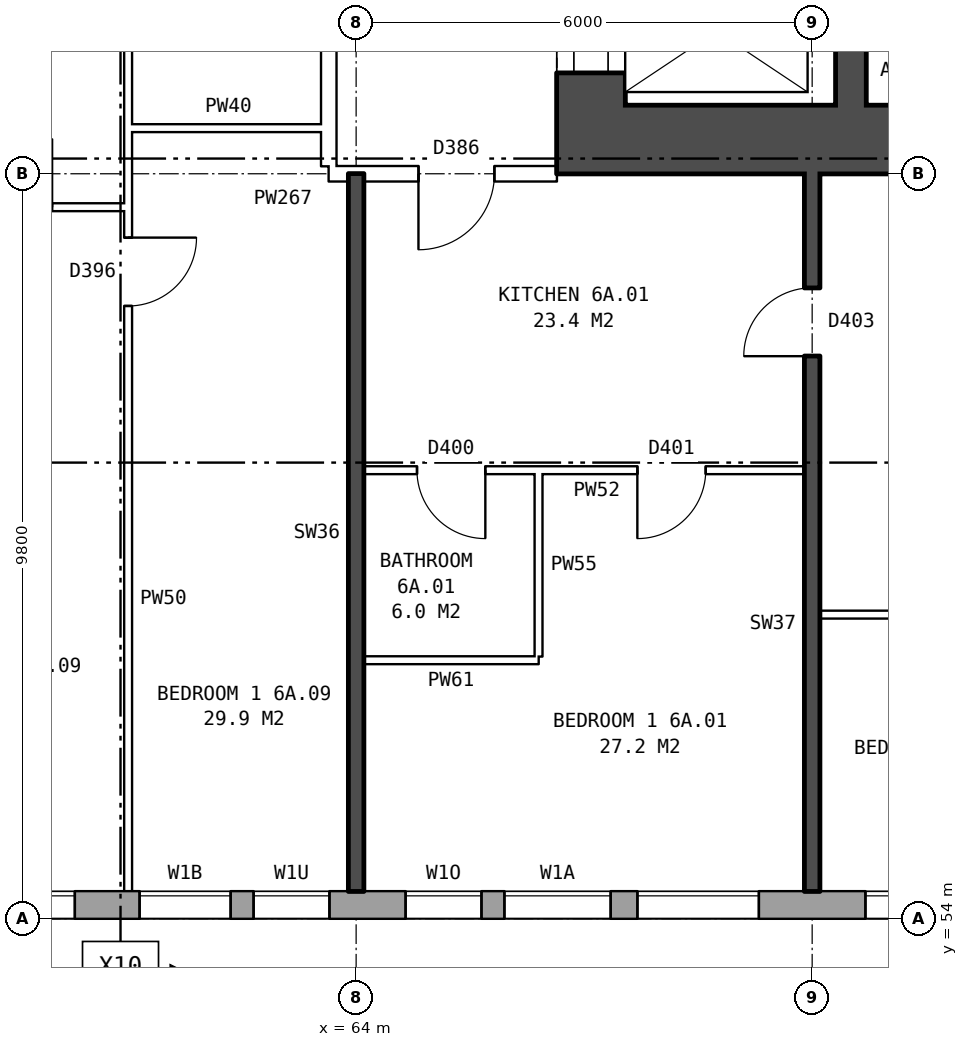
"""IFC4 building model, lengths in metres.
Left out: names, types, materials, properties, quantities, classifications, styles, units other than length and angle.
Written with IfcOpenShell. Run it as: python <this file> out.ifc"""

import sys

from ifc_helpers import new_model, si_unit, direction, frame, frame_2d, origin, place, context, subcontext, project, spatial, rectangle, extrude, element, fill, save


model = new_model("IFC4")
c1 = context("Model", 3, precision=1e-05, world=origin(), true_north=direction((0.0, 1.0)))
c2 = subcontext(c1, "Body", "Model", "MODEL_VIEW")
j1 = project(units=[si_unit("LENGTHUNIT", "METRE"), si_unit("PLANEANGLEUNIT", "RADIAN")], contexts=[c1])
p1 = place(None, origin())
s1 = spatial("IfcSite", under=j1, at=p1, CompositionType="ELEMENT")
p2 = place(p1, origin())
s2 = spatial("IfcBuilding", under=s1, at=p2, CompositionType="ELEMENT")
p3 = place(p2, frame((0.0, 0.0, 25.7)))
s3 = spatial("IfcBuildingStorey", under=s2, at=p3, CompositionType="ELEMENT", Elevation=25.7)
p4 = place(p3, frame((22.825, 54.18, 0.0), z_axis=(0.0, 0.0, 1.0), x_axis=(1.0, 0.0, 0.0)))
e1 = element("IfcWall", 1, at=p4, inside=s3, PredefinedType="STANDARD", context=c2, shape_type="SweptSolid", body=[
    extrude(rectangle(XDim=50.101, YDim=0.36, at=frame_2d((25.05, 0.0))), origin(), (0.0, 0.0, 1.0), 2.85),
])
p5 = place(p4, frame((2.875, 0.0, 0.8)))
e2 = element("IfcOpeningElement", 2, at=p5, cuts=e1, PredefinedType="OPENING", context=c2, shape_type="SweptSolid", body=[
    extrude(rectangle(XDim=1.6, YDim=1.8, at=frame_2d((0.8, 0.9))), frame((0.0, 0.19, 0.0), z_axis=(0.0, -1.0, 0.0), x_axis=(1.0, 0.0, 0.0)), (0.0, 0.0, 1.0), 0.38),
])
p6 = place(p4, frame((5.875, 0.0, 0.8)))
e3 = element("IfcOpeningElement", 3, at=p6, cuts=e1, PredefinedType="OPENING", context=c2, shape_type="SweptSolid", body=[
    extrude(rectangle(XDim=1.6, YDim=1.8, at=frame_2d((0.8, 0.9))), frame((0.0, 0.19, 0.0), z_axis=(0.0, -1.0, 0.0), x_axis=(1.0, 0.0, 0.0)), (0.0, 0.0, 1.0), 0.38),
])
p7 = place(p4, frame((7.775, 0.0, 1.6)))
e4 = element("IfcOpeningElement", 4, at=p7, cuts=e1, PredefinedType="OPENING", context=c2, shape_type="SweptSolid", body=[
    extrude(rectangle(XDim=0.8, YDim=0.9, at=frame_2d((0.4, 0.45))), frame((0.0, 0.19, 0.0), z_axis=(0.0, -1.0, 0.0), x_axis=(1.0, 0.0, 0.0)), (0.0, 0.0, 1.0), 0.38),
])
p8 = place(p4, frame((11.875, 0.0, 0.8)))
e5 = element("IfcOpeningElement", 5, at=p8, cuts=e1, PredefinedType="OPENING", context=c2, shape_type="SweptSolid", body=[
    extrude(rectangle(XDim=1.6, YDim=1.8, at=frame_2d((0.8, 0.9))), frame((0.0, 0.19, 0.0), z_axis=(0.0, -1.0, 0.0), x_axis=(1.0, 0.0, 0.0)), (0.0, 0.0, 1.0), 0.38),
])
p9 = place(p4, frame((14.875, 0.0, 0.8)))
e6 = element("IfcOpeningElement", 6, at=p9, cuts=e1, PredefinedType="OPENING", context=c2, shape_type="SweptSolid", body=[
    extrude(rectangle(XDim=1.6, YDim=1.8, at=frame_2d((0.8, 0.9))), frame((0.0, 0.19, 0.0), z_axis=(0.0, -1.0, 0.0), x_axis=(1.0, 0.0, 0.0)), (0.0, 0.0, 1.0), 0.38),
])
p10 = place(p4, frame((17.875, 0.0, 0.8)))
e7 = element("IfcOpeningElement", 7, at=p10, cuts=e1, PredefinedType="OPENING", context=c2, shape_type="SweptSolid", body=[
    extrude(rectangle(XDim=1.6, YDim=1.8, at=frame_2d((0.8, 0.9))), frame((0.0, 0.19, 0.0), z_axis=(0.0, -1.0, 0.0), x_axis=(1.0, 0.0, 0.0)), (0.0, 0.0, 1.0), 0.38),
])
p11 = place(p4, frame((20.875, 0.0, 0.8)))
e8 = element("IfcOpeningElement", 8, at=p11, cuts=e1, PredefinedType="OPENING", context=c2, shape_type="SweptSolid", body=[
    extrude(rectangle(XDim=1.6, YDim=1.8, at=frame_2d((0.8, 0.9))), frame((0.0, 0.19, 0.0), z_axis=(0.0, -1.0, 0.0), x_axis=(1.0, 0.0, 0.0)), (0.0, 0.0, 1.0), 0.38),
])
p12 = place(p4, frame((23.875, 0.0, 0.8)))
e9 = element("IfcOpeningElement", 9, at=p12, cuts=e1, PredefinedType="OPENING", context=c2, shape_type="SweptSolid", body=[
    extrude(rectangle(XDim=1.6, YDim=1.8, at=frame_2d((0.8, 0.9))), frame((0.0, 0.19, 0.0), z_axis=(0.0, -1.0, 0.0), x_axis=(1.0, 0.0, 0.0)), (0.0, 0.0, 1.0), 0.38),
])
p13 = place(p4, frame((26.875, 0.0, 0.8)))
e10 = element("IfcOpeningElement", 10, at=p13, cuts=e1, PredefinedType="OPENING", context=c2, shape_type="SweptSolid", body=[
    extrude(rectangle(XDim=1.6, YDim=1.8, at=frame_2d((0.8, 0.9))), frame((0.0, 0.19, 0.0), z_axis=(0.0, -1.0, 0.0), x_axis=(1.0, 0.0, 0.0)), (0.0, 0.0, 1.0), 0.38),
])
p14 = place(p4, frame((29.875, 0.0, 0.8)))
e11 = element("IfcOpeningElement", 11, at=p14, cuts=e1, PredefinedType="OPENING", context=c2, shape_type="SweptSolid", body=[
    extrude(rectangle(XDim=1.6, YDim=1.8, at=frame_2d((0.8, 0.9))), frame((0.0, 0.19, 0.0), z_axis=(0.0, -1.0, 0.0), x_axis=(1.0, 0.0, 0.0)), (0.0, 0.0, 1.0), 0.38),
])
p15 = place(p4, frame((32.875, 0.0, 0.8)))
e12 = element("IfcOpeningElement", 12, at=p15, cuts=e1, PredefinedType="OPENING", context=c2, shape_type="SweptSolid", body=[
    extrude(rectangle(XDim=1.6, YDim=1.8, at=frame_2d((0.8, 0.9))), frame((0.0, 0.19, 0.0), z_axis=(0.0, -1.0, 0.0), x_axis=(1.0, 0.0, 0.0)), (0.0, 0.0, 1.0), 0.38),
])
p16 = place(p4, frame((35.875, 0.0, 0.8)))
e13 = element("IfcOpeningElement", 13, at=p16, cuts=e1, PredefinedType="OPENING", context=c2, shape_type="SweptSolid", body=[
    extrude(rectangle(XDim=1.6, YDim=1.8, at=frame_2d((0.8, 0.9))), frame((0.0, 0.19, 0.0), z_axis=(0.0, -1.0, 0.0), x_axis=(1.0, 0.0, 0.0)), (0.0, 0.0, 1.0), 0.38),
])
p17 = place(p4, frame((38.325, 0.0, 0.15)))
e14 = element("IfcOpeningElement", 14, at=p17, cuts=e1, PredefinedType="OPENING", context=c2, shape_type="SweptSolid", body=[
    extrude(rectangle(XDim=1.2, YDim=1.8, at=frame_2d((0.6, 0.9))), frame((0.0, 0.19, 0.0), z_axis=(0.0, -1.0, 0.0), x_axis=(1.0, 0.0, 0.0)), (0.0, 0.0, 1.0), 0.38),
])
p18 = place(p4, frame((41.825, 0.0, 1.4)))
e15 = element("IfcOpeningElement", 15, at=p18, cuts=e1, PredefinedType="OPENING", context=c2, shape_type="SweptSolid", body=[
    extrude(rectangle(XDim=1.0, YDim=1.2, at=frame_2d((0.5, 0.6))), frame((0.0, 0.19, 0.0), z_axis=(0.0, -1.0, 0.0), x_axis=(1.0, 0.0, 0.0)), (0.0, 0.0, 1.0), 0.38),
])
p19 = place(p4, frame((44.875, 0.0, 0.8)))
e16 = element("IfcOpeningElement", 16, at=p19, cuts=e1, PredefinedType="OPENING", context=c2, shape_type="SweptSolid", body=[
    extrude(rectangle(XDim=1.6, YDim=1.8, at=frame_2d((0.8, 0.9))), frame((0.0, 0.19, 0.0), z_axis=(0.0, -1.0, 0.0), x_axis=(1.0, 0.0, 0.0)), (0.0, 0.0, 1.0), 0.38),
])
p20 = place(p4, frame((47.875, 0.0, 0.8)))
e17 = element("IfcOpeningElement", 17, at=p20, cuts=e1, PredefinedType="OPENING", context=c2, shape_type="SweptSolid", body=[
    extrude(rectangle(XDim=1.6, YDim=1.8, at=frame_2d((0.8, 0.9))), frame((0.0, 0.19, 0.0), z_axis=(0.0, -1.0, 0.0), x_axis=(1.0, 0.0, 0.0)), (0.0, 0.0, 1.0), 0.38),
])
p21 = place(p4, frame((10.175, 0.0, 0.8)))
e18 = element("IfcOpeningElement", 18, at=p21, cuts=e1, PredefinedType="OPENING", context=c2, shape_type="SweptSolid", body=[
    extrude(rectangle(XDim=0.8, YDim=0.9, at=frame_2d((0.4, 0.45))), frame((0.0, 0.19, 0.0), z_axis=(0.0, -1.0, 0.0), x_axis=(1.0, 0.0, 0.0)), (0.0, 0.0, 1.0), 0.38),
])
p22 = place(p4, frame((39.825, 0.0, 0.15)))
e19 = element("IfcOpeningElement", 19, at=p22, cuts=e1, PredefinedType="OPENING", context=c2, shape_type="SweptSolid", body=[
    extrude(rectangle(XDim=1.0, YDim=0.9, at=frame_2d((0.5, 0.45))), frame((0.0, 0.19, 0.0), z_axis=(0.0, -1.0, 0.0), x_axis=(1.0, 0.0, 0.0)), (0.0, 0.0, 1.0), 0.38),
])
p23 = place(p4, frame((43.125, 0.0, 0.8)))
e20 = element("IfcOpeningElement", 20, at=p23, cuts=e1, PredefinedType="OPENING", context=c2, shape_type="SweptSolid", body=[
    extrude(rectangle(XDim=1.4, YDim=1.8, at=frame_2d((0.7, 0.9))), frame((0.0, 0.19, 0.0), z_axis=(0.0, -1.0, 0.0), x_axis=(1.0, 0.0, 0.0)), (0.0, 0.0, 1.0), 0.38),
])
p24 = place(p3, frame((67.09, 64.7, 0.0), z_axis=(0.0, 0.0, 1.0), x_axis=(0.0, 1.0, 0.0)))
e21 = element("IfcWall", 21, at=p24, inside=s3, PredefinedType="SHEAR", context=c2, shape_type="SweptSolid", body=[
    extrude(rectangle(XDim=10.6, YDim=0.9, at=frame_2d((5.3, 0.0))), origin(), (0.0, 0.0, 1.0), 2.85),
])
p25 = place(p24, frame((0.425, 0.0, 0.0)))
e22 = element("IfcOpeningElement", 22, at=p25, cuts=e21, PredefinedType="OPENING", context=c2, shape_type="SweptSolid", body=[
    extrude(rectangle(XDim=1.1, YDim=2.1, at=frame_2d((0.55, 1.05))), frame((0.0, 0.46, 0.0), z_axis=(0.0, -1.0, 0.0), x_axis=(1.0, 0.0, 0.0)), (0.0, 0.0, 1.0), 0.92),
])
p26 = place(p24, frame((9.0, 0.0, 0.0)))
e23 = element("IfcOpeningElement", 23, at=p26, cuts=e21, PredefinedType="OPENING", context=c2, shape_type="SweptSolid", body=[
    extrude(rectangle(XDim=1.1, YDim=2.1, at=frame_2d((0.55, 1.05))), frame((0.0, 0.46, 0.0), z_axis=(0.0, -1.0, 0.0), x_axis=(1.0, 0.0, 0.0)), (0.0, 0.0, 1.0), 0.92),
])
p27 = place(p3, frame((66.64, 64.25, 0.0), z_axis=(0.0, 0.0, 1.0), x_axis=(1.0, 0.0, 0.0)))
e24 = element("IfcWall", 24, at=p27, inside=s3, PredefinedType="SHEAR", context=c2, shape_type="SweptSolid", body=[
    extrude(rectangle(XDim=9.0, YDim=0.9, at=frame_2d((4.5, 0.0))), origin(), (0.0, 0.0, 1.0), 2.85),
])
p28 = place(p3, frame((70.51, 64.7, 0.0), z_axis=(0.0, 0.0, 1.0), x_axis=(0.0, 1.0, 0.0)))
e25 = element("IfcWall", 25, at=p28, inside=s3, PredefinedType="SHEAR", context=c2, shape_type="SweptSolid", body=[
    extrude(rectangle(XDim=1.95, YDim=0.4, at=frame_2d((0.975, 0.0))), origin(), (0.0, 0.0, 1.0), 2.85),
])
p29 = place(p3, frame((63.64, 63.9, 0.0), z_axis=(0.0, 0.0, 1.0), x_axis=(0.0, 1.0, 0.0)))
e26 = element("IfcWall", 26, at=p29, inside=s3, PredefinedType="PARTITIONING", context=c2, shape_type="SweptSolid", body=[
    extrude(rectangle(XDim=12.2, YDim=0.2, at=frame_2d((6.1, 0.0))), origin(), (0.0, 0.0, 1.0), 2.85),
])
p30 = place(p29, frame((5.1, 0.0, 0.0)))
e27 = element("IfcOpeningElement", 27, at=p30, cuts=e26, PredefinedType="OPENING", context=c2, shape_type="SweptSolid", body=[
    extrude(rectangle(XDim=2.0, YDim=2.1, at=frame_2d((1.0, 1.05))), frame((0.0, 0.11, 0.0), z_axis=(0.0, -1.0, 0.0), x_axis=(1.0, 0.0, 0.0)), (0.0, 0.0, 1.0), 0.22),
])
p31 = place(p3, frame((64.1, 57.4, 0.0), z_axis=(0.0, 0.0, 1.0), x_axis=(1.0, 0.0, 0.0)))
e28 = element("IfcWall", 28, at=p31, inside=s3, PredefinedType="PARTITIONING", context=c2, shape_type="SweptSolid", body=[
    extrude(rectangle(XDim=2.3, YDim=0.1, at=frame_2d((1.15, 0.0))), origin(), (0.0, 0.0, 1.0), 2.85),
])
p32 = place(p3, frame((70.1, 58.0, 0.0), z_axis=(0.0, 0.0, 1.0), x_axis=(1.0, 0.0, 0.0)))
e29 = element("IfcWall", 29, at=p32, inside=s3, PredefinedType="PARTITIONING", context=c2, shape_type="SweptSolid", body=[
    extrude(rectangle(XDim=5.54, YDim=0.1, at=frame_2d((2.77, 0.0))), origin(), (0.0, 0.0, 1.0), 2.85),
])
p33 = place(p32, frame((2.32, 0.0, 0.0)))
e30 = element("IfcOpeningElement", 30, at=p33, cuts=e29, PredefinedType="OPENING", context=c2, shape_type="SweptSolid", body=[
    extrude(rectangle(XDim=0.9, YDim=2.1, at=frame_2d((0.45, 1.05))), frame((0.0, 0.06, 0.0), z_axis=(0.0, -1.0, 0.0), x_axis=(1.0, 0.0, 0.0)), (0.0, 0.0, 1.0), 0.12),
])
p34 = place(p3, frame((64.1, 59.9, 0.0), z_axis=(0.0, 0.0, 1.0), x_axis=(1.0, 0.0, 0.0)))
e31 = element("IfcWall", 31, at=p34, inside=s3, PredefinedType="PARTITIONING", context=c2, shape_type="SweptSolid", body=[
    extrude(rectangle(XDim=5.8, YDim=0.1, at=frame_2d((2.9, 0.0))), origin(), (0.0, 0.0, 1.0), 2.85),
])
p35 = place(p34, frame((3.6, 0.0, 0.0)))
e32 = element("IfcOpeningElement", 32, at=p35, cuts=e31, PredefinedType="OPENING", context=c2, shape_type="SweptSolid", body=[
    extrude(rectangle(XDim=0.9, YDim=2.1, at=frame_2d((0.45, 1.05))), frame((0.0, 0.06, 0.0), z_axis=(0.0, -1.0, 0.0), x_axis=(1.0, 0.0, 0.0)), (0.0, 0.0, 1.0), 0.12),
])
p36 = place(p34, frame((0.7, 0.0, 0.0)))
e33 = element("IfcOpeningElement", 33, at=p36, cuts=e31, PredefinedType="OPENING", context=c2, shape_type="SweptSolid", body=[
    extrude(rectangle(XDim=0.9, YDim=2.1, at=frame_2d((0.45, 1.05))), frame((0.0, 0.06, 0.0), z_axis=(0.0, -1.0, 0.0), x_axis=(1.0, 0.0, 0.0)), (0.0, 0.0, 1.0), 0.12),
])
p37 = place(p3, frame((58.1, 63.36, 0.0), z_axis=(0.0, 0.0, 1.0), x_axis=(1.0, 0.0, 0.0)))
e34 = element("IfcWall", 34, at=p37, inside=s3, PredefinedType="PARTITIONING", context=c2, shape_type="SweptSolid", body=[
    extrude(rectangle(XDim=2.9, YDim=0.1, at=frame_2d((1.45, 0.0))), origin(), (0.0, 0.0, 1.0), 2.85),
])
p38 = place(p37, frame((1.0, 0.0, 0.0)))
e35 = element("IfcOpeningElement", 35, at=p38, cuts=e34, PredefinedType="OPENING", context=c2, shape_type="SweptSolid", body=[
    extrude(rectangle(XDim=0.9, YDim=2.1, at=frame_2d((0.45, 1.05))), frame((0.0, 0.06, 0.0), z_axis=(0.0, -1.0, 0.0), x_axis=(1.0, 0.0, 0.0)), (0.0, 0.0, 1.0), 0.12),
])
p39 = place(p3, frame((63.64, 63.8, 0.0), z_axis=(0.0, 0.0, 1.0), x_axis=(1.0, 0.0, 0.0)))
e36 = element("IfcWall", 36, at=p39, inside=s3, PredefinedType="PARTITIONING", context=c2, shape_type="SweptSolid", body=[
    extrude(rectangle(XDim=3.0, YDim=0.2, at=frame_2d((1.5, 0.0))), origin(), (0.0, 0.0, 1.0), 2.85),
])
p40 = place(p39, frame((1.18, 0.0, 0.0)))
e37 = element("IfcOpeningElement", 37, at=p40, cuts=e36, PredefinedType="OPENING", context=c2, shape_type="SweptSolid", body=[
    extrude(rectangle(XDim=1.0, YDim=2.1, at=frame_2d((0.5, 1.05))), frame((0.0, 0.11, 0.0), z_axis=(0.0, -1.0, 0.0), x_axis=(1.0, 0.0, 0.0)), (0.0, 0.0, 1.0), 0.22),
])
p41 = place(p3, frame((61.0, 64.4, 0.0), z_axis=(0.0, 0.0, 1.0), x_axis=(1.0, 0.0, 0.0)))
e38 = element("IfcWall", 38, at=p41, inside=s3, PredefinedType="PARTITIONING", context=c2, shape_type="SweptSolid", body=[
    extrude(rectangle(XDim=2.64, YDim=0.1, at=frame_2d((1.32, 0.0))), origin(), (0.0, 0.0, 1.0), 2.85),
])
p42 = place(p3, frame((61.0, 54.36, 0.0), z_axis=(0.0, 0.0, 1.0), x_axis=(0.0, 1.0, 0.0)))
e39 = element("IfcWall", 39, at=p42, inside=s3, PredefinedType="PARTITIONING", context=c2, shape_type="SweptSolid", body=[
    extrude(rectangle(XDim=14.34, YDim=0.1, at=frame_2d((7.17, 0.0))), origin(), (0.0, 0.0, 1.0), 2.85),
])
p43 = place(p42, frame((7.7, 0.0, 0.0)))
e40 = element("IfcOpeningElement", 40, at=p43, cuts=e39, PredefinedType="OPENING", context=c2, shape_type="SweptSolid", body=[
    extrude(rectangle(XDim=0.9, YDim=2.1, at=frame_2d((0.45, 1.05))), frame((0.0, 0.06, 0.0), z_axis=(0.0, -1.0, 0.0), x_axis=(1.0, 0.0, 0.0)), (0.0, 0.0, 1.0), 0.12),
])
p44 = place(p42, frame((13.04, 0.0, 0.0)))
e41 = element("IfcOpeningElement", 41, at=p44, cuts=e39, PredefinedType="OPENING", context=c2, shape_type="SweptSolid", body=[
    extrude(rectangle(XDim=0.9, YDim=2.1, at=frame_2d((0.45, 1.05))), frame((0.0, 0.06, 0.0), z_axis=(0.0, -1.0, 0.0), x_axis=(1.0, 0.0, 0.0)), (0.0, 0.0, 1.0), 0.12),
])
p45 = place(p3, frame((64.0, 54.36, 0.0), z_axis=(0.0, 0.0, 1.0), x_axis=(0.0, 1.0, 0.0)))
e42 = element("IfcWall", 42, at=p45, inside=s3, PredefinedType="SOLIDWALL", context=c2, shape_type="SweptSolid", body=[
    extrude(rectangle(XDim=9.44, YDim=0.2, at=frame_2d((4.72, 0.0))), origin(), (0.0, 0.0, 1.0), 2.85),
])
p46 = place(p3, frame((66.4, 57.45, 0.0), z_axis=(0.0, 0.0, 1.0), x_axis=(0.0, 1.0, 0.0)))
e43 = element("IfcWall", 43, at=p46, inside=s3, PredefinedType="PARTITIONING", context=c2, shape_type="SweptSolid", body=[
    extrude(rectangle(XDim=2.4, YDim=0.1, at=frame_2d((1.2, 0.0))), origin(), (0.0, 0.0, 1.0), 2.85),
])
p47 = place(p3, frame((70.0, 54.36, 0.0), z_axis=(0.0, 0.0, 1.0), x_axis=(0.0, 1.0, 0.0)))
e44 = element("IfcWall", 44, at=p47, inside=s3, PredefinedType="SOLIDWALL", context=c2, shape_type="SweptSolid", body=[
    extrude(rectangle(XDim=9.44, YDim=0.2, at=frame_2d((4.72, 0.0))), origin(), (0.0, 0.0, 1.0), 2.85),
])
p48 = place(p47, frame((7.04, 0.0, 0.0)))
e45 = element("IfcOpeningElement", 45, at=p48, cuts=e44, PredefinedType="OPENING", context=c2, shape_type="SweptSolid", body=[
    extrude(rectangle(XDim=0.9, YDim=2.1, at=frame_2d((0.45, 1.05))), frame((0.0, 0.11, 0.0), z_axis=(0.0, -1.0, 0.0), x_axis=(1.0, 0.0, 0.0)), (0.0, 0.0, 1.0), 0.22),
])
p49 = place(p16, origin())
e46 = element("IfcWindow", 46, at=p49, inside=s3, PartitioningType="SINGLE_PANEL", PredefinedType="WINDOW", context=c2, shape_type="SweptSolid", body=[
    extrude(rectangle(XDim=1.6, YDim=1.8, at=frame_2d((0.8, 0.9))), frame((0.0, 0.15, 0.0), z_axis=(0.0, -1.0, 0.0), x_axis=(1.0, 0.0, 0.0)), (0.0, 0.0, 1.0), 0.06),
])
fill(e13, e46)
p50 = place(p17, origin())
e47 = element("IfcWindow", 47, at=p50, inside=s3, PartitioningType="SINGLE_PANEL", PredefinedType="WINDOW", context=c2, shape_type="SweptSolid", body=[
    extrude(rectangle(XDim=1.2, YDim=1.8, at=frame_2d((0.6, 0.9))), frame((0.0, 0.15, 0.0), z_axis=(0.0, -1.0, 0.0), x_axis=(1.0, 0.0, 0.0)), (0.0, 0.0, 1.0), 0.06),
])
fill(e14, e47)
p51 = place(p18, origin())
e48 = element("IfcWindow", 48, at=p51, inside=s3, PartitioningType="SINGLE_PANEL", PredefinedType="WINDOW", context=c2, shape_type="SweptSolid", body=[
    extrude(rectangle(XDim=1.0, YDim=1.2, at=frame_2d((0.5, 0.6))), frame((0.0, 0.15, 0.0), z_axis=(0.0, -1.0, 0.0), x_axis=(1.0, 0.0, 0.0)), (0.0, 0.0, 1.0), 0.06),
])
fill(e15, e48)
p52 = place(p19, origin())
e49 = element("IfcWindow", 49, at=p52, inside=s3, PartitioningType="SINGLE_PANEL", PredefinedType="WINDOW", context=c2, shape_type="SweptSolid", body=[
    extrude(rectangle(XDim=1.6, YDim=1.8, at=frame_2d((0.8, 0.9))), frame((0.0, 0.15, 0.0), z_axis=(0.0, -1.0, 0.0), x_axis=(1.0, 0.0, 0.0)), (0.0, 0.0, 1.0), 0.06),
])
fill(e16, e49)
p53 = place(p20, origin())
e50 = element("IfcWindow", 50, at=p53, inside=s3, PartitioningType="SINGLE_PANEL", PredefinedType="WINDOW", context=c2, shape_type="SweptSolid", body=[
    extrude(rectangle(XDim=1.6, YDim=1.8, at=frame_2d((0.8, 0.9))), frame((0.0, 0.15, 0.0), z_axis=(0.0, -1.0, 0.0), x_axis=(1.0, 0.0, 0.0)), (0.0, 0.0, 1.0), 0.06),
])
fill(e17, e50)
p54 = place(p25, origin())
e51 = element("IfcDoor", 51, at=p54, inside=s3, OperationType="DOUBLE_DOOR_SLIDING", PredefinedType="DOOR", context=c2, shape_type="SweptSolid", body=[
    extrude(rectangle(XDim=1.1, YDim=2.1, at=frame_2d((0.55, 1.05))), frame((0.0, -0.385, 0.0), z_axis=(0.0, -1.0, 0.0), x_axis=(1.0, 0.0, 0.0)), (0.0, 0.0, 1.0), 0.05),
])
fill(e22, e51)
p55 = place(p35, frame((0.9, 0.0, 0.0), z_axis=(0.0, 0.0, 1.0), x_axis=(-1.0, 0.0, 0.0)))
e52 = element("IfcDoor", 52, at=p55, inside=s3, OperationType="SINGLE_SWING_RIGHT", PredefinedType="DOOR", context=c2, shape_type="SweptSolid", body=[
    extrude(rectangle(XDim=0.9, YDim=2.1, at=frame_2d((0.45, 1.05))), frame((0.0, 0.025, 0.0), z_axis=(0.0, -1.0, 0.0), x_axis=(1.0, 0.0, 0.0)), (0.0, 0.0, 1.0), 0.05),
])
fill(e32, e52)
p56 = place(p40, frame((1.0, 0.0, 0.0), z_axis=(0.0, 0.0, 1.0), x_axis=(-1.0, 0.0, 0.0)))
e53 = element("IfcDoor", 53, at=p56, inside=s3, OperationType="SINGLE_SWING_RIGHT", PredefinedType="DOOR", context=c2, shape_type="SweptSolid", body=[
    extrude(rectangle(XDim=1.0, YDim=2.1, at=frame_2d((0.5, 1.05))), frame((0.0, 0.025, 0.0), z_axis=(0.0, -1.0, 0.0), x_axis=(1.0, 0.0, 0.0)), (0.0, 0.0, 1.0), 0.05),
])
fill(e37, e53)
p57 = place(p48, origin())
e54 = element("IfcDoor", 54, at=p57, inside=s3, OperationType="SINGLE_SWING_LEFT", PredefinedType="DOOR", context=c2, shape_type="SweptSolid", body=[
    extrude(rectangle(XDim=0.9, YDim=2.1, at=frame_2d((0.45, 1.05))), frame((0.0, 0.025, 0.0), z_axis=(0.0, -1.0, 0.0), x_axis=(1.0, 0.0, 0.0)), (0.0, 0.0, 1.0), 0.05),
])
fill(e45, e54)
p58 = place(p36, frame((0.9, 0.0, 0.0), z_axis=(0.0, 0.0, 1.0), x_axis=(-1.0, 0.0, 0.0)))
e55 = element("IfcDoor", 55, at=p58, inside=s3, OperationType="SINGLE_SWING_LEFT", PredefinedType="DOOR", context=c2, shape_type="SweptSolid", body=[
    extrude(rectangle(XDim=0.9, YDim=2.1, at=frame_2d((0.45, 1.05))), frame((0.0, 0.025, 0.0), z_axis=(0.0, -1.0, 0.0), x_axis=(1.0, 0.0, 0.0)), (0.0, 0.0, 1.0), 0.05),
])
fill(e33, e55)
p59 = place(p43, frame((0.9, 0.0, 0.0), z_axis=(0.0, 0.0, 1.0), x_axis=(-1.0, 0.0, 0.0)))
e56 = element("IfcDoor", 56, at=p59, inside=s3, OperationType="SINGLE_SWING_LEFT", PredefinedType="DOOR", context=c2, shape_type="SweptSolid", body=[
    extrude(rectangle(XDim=0.9, YDim=2.1, at=frame_2d((0.45, 1.05))), frame((0.0, 0.025, 0.0), z_axis=(0.0, -1.0, 0.0), x_axis=(1.0, 0.0, 0.0)), (0.0, 0.0, 1.0), 0.05),
])
fill(e40, e56)
p60 = place(p22, origin())
e57 = element("IfcWindow", 57, at=p60, inside=s3, PartitioningType="SINGLE_PANEL", PredefinedType="WINDOW", context=c2, shape_type="SweptSolid", body=[
    extrude(rectangle(XDim=1.0, YDim=0.9, at=frame_2d((0.5, 0.45))), frame((0.0, 0.15, 0.0), z_axis=(0.0, -1.0, 0.0), x_axis=(1.0, 0.0, 0.0)), (0.0, 0.0, 1.0), 0.06),
])
fill(e19, e57)
p61 = place(p23, origin())
e58 = element("IfcWindow", 58, at=p61, inside=s3, PartitioningType="SINGLE_PANEL", PredefinedType="WINDOW", context=c2, shape_type="SweptSolid", body=[
    extrude(rectangle(XDim=1.4, YDim=1.8, at=frame_2d((0.7, 0.9))), frame((0.0, 0.15, 0.0), z_axis=(0.0, -1.0, 0.0), x_axis=(1.0, 0.0, 0.0)), (0.0, 0.0, 1.0), 0.06),
])
fill(e20, e58)
save(model, sys.argv[1])
